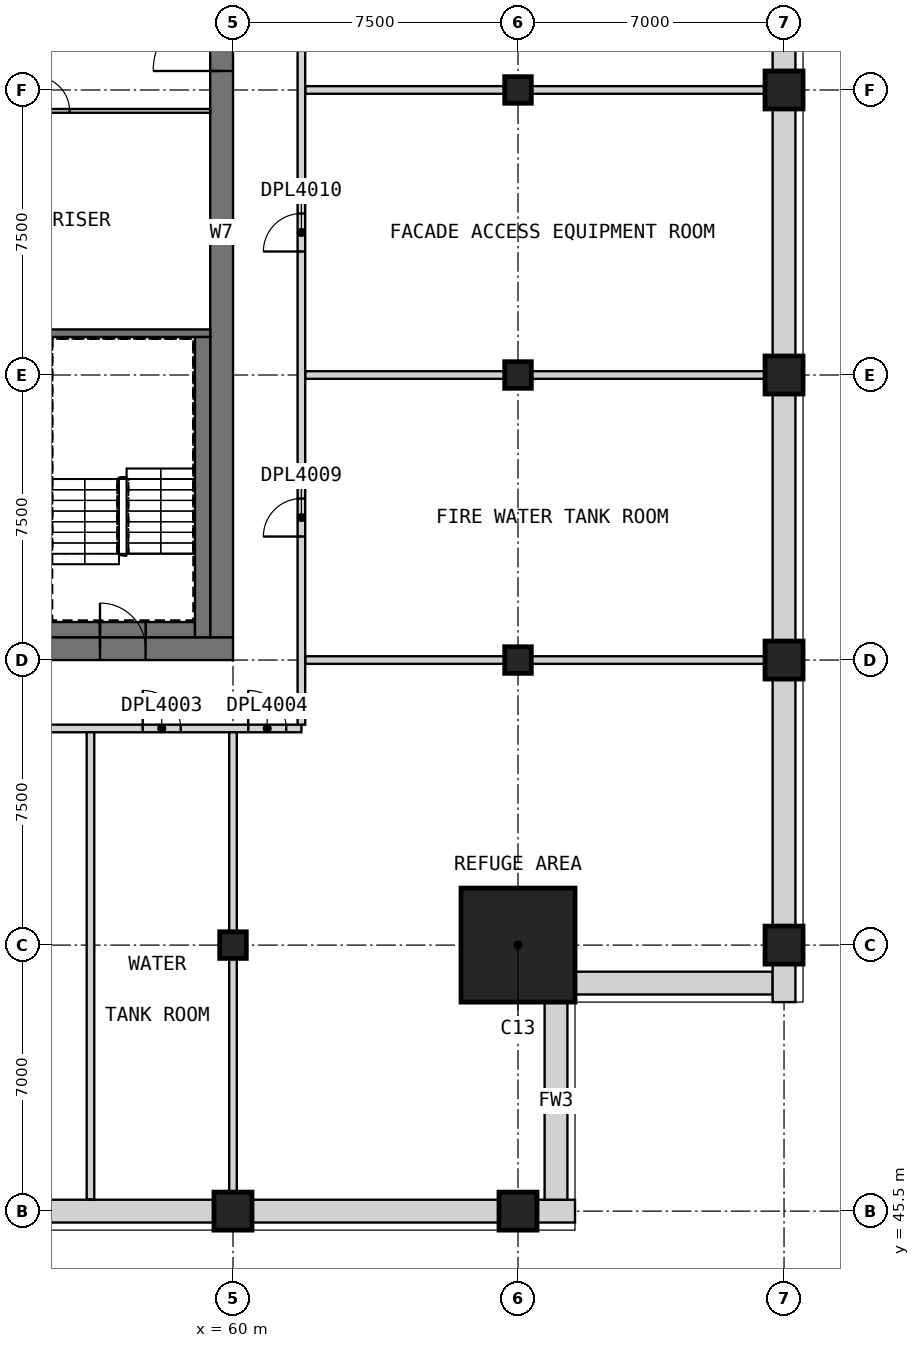
"""IFC4 building model, lengths in metres.
Left out: names, types, materials, properties, quantities, classifications, styles, units other than length and angle.
Written with IfcOpenShell. Run it as: python <this file> out.ifc"""

import sys

from ifc_helpers import new_model, si_unit, direction, frame, frame_2d, origin, origin_2d, place, context, subcontext, project, spatial, rectangle, extrude, element, fill, save


model = new_model("IFC4")
c1 = context("Model", 3, precision=1e-05, world=origin(), true_north=direction((0.0, 1.0)))
c2 = subcontext(c1, "Body", "Model", "MODEL_VIEW")
j1 = project(units=[si_unit("LENGTHUNIT", "METRE"), si_unit("PLANEANGLEUNIT", "RADIAN")], contexts=[c1])
p1 = place(None, origin())
s1 = spatial("IfcSite", under=j1, at=p1, CompositionType="ELEMENT")
p2 = place(p1, origin())
s2 = spatial("IfcBuilding", under=s1, at=p2, CompositionType="ELEMENT")
p3 = place(p2, frame((0.0, 0.0, 314.7)))
s3 = spatial("IfcBuildingStorey", under=s2, at=p3, CompositionType="ELEMENT", Elevation=314.7)
p4 = place(p3, frame((60.0, 45.5, 0.0), z_axis=(0.0, 0.0, 1.0), x_axis=(1.0, 0.0, 0.0)))
e1 = element("IfcColumn", 1, at=p4, inside=s3, PredefinedType="COLUMN", context=c2, shape_type="SweptSolid", body=[
    extrude(rectangle(XDim=1.0, YDim=1.0, at=origin_2d()), origin(), (0.0, 0.0, 1.0), 5.5),
])
p5 = place(p3, frame((60.0, 52.5, 0.0), z_axis=(0.0, 0.0, 1.0), x_axis=(1.0, 0.0, 0.0)))
e2 = element("IfcColumn", 2, at=p5, inside=s3, PredefinedType="COLUMN", context=c2, shape_type="SweptSolid", body=[
    extrude(rectangle(XDim=0.7, YDim=0.7, at=origin_2d()), origin(), (0.0, 0.0, 1.0), 5.5),
])
p6 = place(p3, frame((67.5, 45.5, 0.0), z_axis=(0.0, 0.0, 1.0), x_axis=(1.0, 0.0, 0.0)))
e3 = element("IfcColumn", 3, at=p6, inside=s3, PredefinedType="COLUMN", context=c2, shape_type="SweptSolid", body=[
    extrude(rectangle(XDim=1.0, YDim=1.0, at=origin_2d()), origin(), (0.0, 0.0, 1.0), 5.5),
])
for number, where, z_axis, x_axis in (
    (4, (67.5, 60.0, 0.0), (0.0, 0.0, 1.0), (1.0, 0.0, 0.0)),
    (5, (67.5, 67.5, 0.0), (0.0, 0.0, 1.0), (1.0, 0.0, 0.0)),
    (6, (67.5, 75.0, 0.0), (0.0, 0.0, 1.0), (1.0, 0.0, 0.0)),
):
    element("IfcColumn", number, at=place(p3, frame(where, z_axis=z_axis, x_axis=x_axis)), inside=s3, PredefinedType="COLUMN", context=c2, shape_type="SweptSolid", body=[
        extrude(rectangle(XDim=0.7, YDim=0.7, at=origin_2d()), origin(), (0.0, 0.0, 1.0), 5.5),
    ])
for number, where, z_axis, x_axis in (
    (7, (74.5, 52.5, 0.0), (0.0, 0.0, 1.0), (1.0, 0.0, 0.0)),
    (8, (74.5, 60.0, 0.0), (0.0, 0.0, 1.0), (1.0, 0.0, 0.0)),
    (9, (74.5, 67.5, 0.0), (0.0, 0.0, 1.0), (1.0, 0.0, 0.0)),
    (10, (74.5, 75.0, 0.0), (0.0, 0.0, 1.0), (1.0, 0.0, 0.0)),
):
    element("IfcColumn", number, at=place(p3, frame(where, z_axis=z_axis, x_axis=x_axis)), inside=s3, PredefinedType="COLUMN", context=c2, shape_type="SweptSolid", body=[
        extrude(rectangle(XDim=1.0, YDim=1.0, at=origin_2d()), origin(), (0.0, 0.0, 1.0), 5.5),
    ])
p7 = place(p3, frame((67.5, 52.5, 0.0), z_axis=(0.0, 0.0, 1.0), x_axis=(1.0, 0.0, 0.0)))
e11 = element("IfcColumn", 11, at=p7, inside=s3, PredefinedType="COLUMN", context=c2, shape_type="SweptSolid", body=[
    extrude(rectangle(XDim=3.0, YDim=3.0, at=origin_2d()), origin(), (0.0, 0.0, 1.0), 5.5),
])
p8 = place(p3, frame((30.0, 60.3, 0.0), z_axis=(0.0, 0.0, 1.0), x_axis=(1.0, 0.0, 0.0)))
e12 = element("IfcWall", 12, at=p8, inside=s3, PredefinedType="SHEAR", context=c2, shape_type="SweptSolid", body=[
    extrude(rectangle(XDim=30.0, YDim=0.6, at=frame_2d((15.0, 0.0))), origin(), (0.0, 0.0, 1.0), 5.5),
])
p9 = place(p8, frame((21.9, 0.0, 0.0)))
e13 = element("IfcOpeningElement", 13, at=p9, cuts=e12, PredefinedType="OPENING", context=c2, shape_type="SweptSolid", body=[
    extrude(rectangle(XDim=1.8, YDim=2.1, at=frame_2d((0.9, 1.05))), frame((0.0, 0.31, 0.0), z_axis=(0.0, -1.0, 0.0), x_axis=(1.0, 0.0, 0.0)), (0.0, 0.0, 1.0), 0.62),
])
p10 = place(p8, frame((26.5, 0.0, 0.0)))
e14 = element("IfcOpeningElement", 14, at=p10, cuts=e12, PredefinedType="OPENING", context=c2, shape_type="SweptSolid", body=[
    extrude(rectangle(XDim=1.2, YDim=2.1, at=frame_2d((0.6, 1.05))), frame((0.0, 0.31, 0.0), z_axis=(0.0, -1.0, 0.0), x_axis=(1.0, 0.0, 0.0)), (0.0, 0.0, 1.0), 0.62),
])
p11 = place(p3, frame((59.7, 60.6, 0.0), z_axis=(0.0, 0.0, 1.0), x_axis=(0.0, 1.0, 0.0)))
e15 = element("IfcWall", 15, at=p11, inside=s3, PredefinedType="SHEAR", context=c2, shape_type="SweptSolid", body=[
    extrude(rectangle(XDim=21.3, YDim=0.6, at=frame_2d((10.65, 0.0))), origin(), (0.0, 0.0, 1.0), 5.5),
])
p12 = place(p11, frame((14.9, 0.0, 0.0)))
e16 = element("IfcOpeningElement", 16, at=p12, cuts=e15, PredefinedType="OPENING", context=c2, shape_type="SweptSolid", body=[
    extrude(rectangle(XDim=1.8, YDim=2.1, at=frame_2d((0.9, 1.05))), frame((0.0, 0.31, 0.0), z_axis=(0.0, -1.0, 0.0), x_axis=(1.0, 0.0, 0.0)), (0.0, 0.0, 1.0), 0.62),
])
for number, where, z_axis, x_axis in (
    (17, (53.0, 45.5, 0.0), (0.0, 0.0, 1.0), (1.0, 0.0, 0.0)),
    (18, (60.5, 45.5, 0.0), (0.0, 0.0, 1.0), (1.0, 0.0, 0.0)),
):
    element("IfcWall", number, at=place(p3, frame(where, z_axis=z_axis, x_axis=x_axis)), inside=s3, PredefinedType="ELEMENTEDWALL", context=c2, shape_type="SweptSolid", body=[
        extrude(rectangle(XDim=6.5, YDim=0.6, at=frame_2d((3.25, 0.0))), origin(), (0.0, 0.0, 1.0), 5.1),
    ])
p13 = place(p3, frame((68.0, 45.5, 0.0), z_axis=(0.0, 0.0, 1.0), x_axis=(1.0, 0.0, 0.0)))
e19 = element("IfcWall", 19, at=p13, inside=s3, PredefinedType="ELEMENTEDWALL", context=c2, shape_type="SweptSolid", body=[
    extrude(rectangle(XDim=1.0, YDim=0.6, at=frame_2d((0.5, 0.0))), origin(), (0.0, 0.0, 1.0), 5.1),
])
for number, where, z_axis, x_axis in (
    (20, (68.5, 45.8, 0.0), (0.0, 0.0, 1.0), (0.0, 1.0, 0.0)),
    (21, (69.0, 51.5, 0.0), (0.0, 0.0, 1.0), (1.0, 0.0, 0.0)),
):
    element("IfcWall", number, at=place(p3, frame(where, z_axis=z_axis, x_axis=x_axis)), inside=s3, PredefinedType="ELEMENTEDWALL", context=c2, shape_type="SweptSolid", body=[
        extrude(rectangle(XDim=5.2, YDim=0.6, at=frame_2d((2.6, 0.0))), origin(), (0.0, 0.0, 1.0), 5.1),
    ])
p14 = place(p3, frame((74.5, 51.0, 0.0), z_axis=(0.0, 0.0, 1.0), x_axis=(0.0, 1.0, 0.0)))
e22 = element("IfcWall", 22, at=p14, inside=s3, PredefinedType="ELEMENTEDWALL", context=c2, shape_type="SweptSolid", body=[
    extrude(rectangle(XDim=1.0, YDim=0.6, at=frame_2d((0.5, 0.0))), origin(), (0.0, 0.0, 1.0), 5.1),
])
for number, where, z_axis, x_axis in (
    (23, (74.5, 53.0, 0.0), (0.0, 0.0, 1.0), (0.0, 1.0, 0.0)),
    (24, (74.5, 60.5, 0.0), (0.0, 0.0, 1.0), (0.0, 1.0, 0.0)),
    (25, (74.5, 68.0, 0.0), (0.0, 0.0, 1.0), (0.0, 1.0, 0.0)),
    (26, (74.5, 75.5, 0.0), (0.0, 0.0, 1.0), (0.0, 1.0, 0.0)),
):
    element("IfcWall", number, at=place(p3, frame(where, z_axis=z_axis, x_axis=x_axis)), inside=s3, PredefinedType="ELEMENTEDWALL", context=c2, shape_type="SweptSolid", body=[
        extrude(rectangle(XDim=6.5, YDim=0.6, at=frame_2d((3.25, 0.0))), origin(), (0.0, 0.0, 1.0), 5.1),
    ])
p15 = place(p3, frame((51.1, 68.6, 0.0), z_axis=(0.0, 0.0, 1.0), x_axis=(1.0, 0.0, 0.0)))
e27 = element("IfcWall", 27, at=p15, inside=s3, PredefinedType="SOLIDWALL", context=c2, shape_type="SweptSolid", body=[
    extrude(rectangle(XDim=8.3, YDim=0.2, at=frame_2d((4.15, 0.0))), origin(), (0.0, 0.0, 1.0), 5.09),
])
for number, where, z_axis, x_axis in (
    (28, (55.2, 60.8, 0.0), (0.0, 0.0, 1.0), (1.0, 0.0, 0.0)),
    (29, (57.7, 60.8, 0.0), (0.0, 0.0, 1.0), (1.0, 0.0, 0.0)),
):
    element("IfcWall", number, at=place(p3, frame(where, z_axis=z_axis, x_axis=x_axis)), inside=s3, PredefinedType="SOLIDWALL", context=c2, shape_type="SweptSolid", body=[
        extrude(rectangle(XDim=1.3, YDim=0.4, at=frame_2d((0.65, 0.0))), origin(), (0.0, 0.0, 1.0), 5.09),
    ])
p16 = place(p3, frame((59.2, 60.6, 0.0), z_axis=(0.0, 0.0, 1.0), x_axis=(0.0, 1.0, 0.0)))
e30 = element("IfcWall", 30, at=p16, inside=s3, PredefinedType="SOLIDWALL", context=c2, shape_type="SweptSolid", body=[
    extrude(rectangle(XDim=7.9, YDim=0.4, at=frame_2d((3.95, 0.0))), origin(), (0.0, 0.0, 1.0), 5.09),
])
p17 = place(p3, frame((56.5, 60.8, 3.24), z_axis=(0.0, 0.0, 1.0), x_axis=(1.0, 0.0, 0.0)))
e31 = element("IfcWall", 31, at=p17, inside=s3, PredefinedType="SOLIDWALL", context=c2, shape_type="SweptSolid", body=[
    extrude(rectangle(XDim=1.2, YDim=0.4, at=frame_2d((0.6, 0.0))), origin(), (0.0, 0.0, 1.0), 1.85),
])
p18 = place(p3, frame((51.1, 74.45, 0.0), z_axis=(0.0, 0.0, 1.0), x_axis=(1.0, 0.0, 0.0)))
e32 = element("IfcWall", 32, at=p18, inside=s3, PredefinedType="PARTITIONING", context=c2, shape_type="SweptSolid", body=[
    extrude(rectangle(XDim=8.3, YDim=0.1, at=frame_2d((4.15, 0.0))), origin(), (0.0, 0.0, 1.0), 5.09),
])
p19 = place(p18, frame((3.7, 0.0, 0.0)))
e33 = element("IfcOpeningElement", 33, at=p19, cuts=e32, PredefinedType="OPENING", context=c2, shape_type="SweptSolid", body=[
    extrude(rectangle(XDim=0.9, YDim=2.1, at=frame_2d((0.45, 1.05))), frame((0.0, 0.06, 0.0), z_axis=(0.0, -1.0, 0.0), x_axis=(1.0, 0.0, 0.0)), (0.0, 0.0, 1.0), 0.12),
])
p20 = place(p3, frame((33.85, 58.2, 0.0), z_axis=(0.0, 0.0, 1.0), x_axis=(1.0, 0.0, 0.0)))
e34 = element("IfcWall", 34, at=p20, inside=s3, PredefinedType="PARTITIONING", context=c2, shape_type="SweptSolid", body=[
    extrude(rectangle(XDim=27.95, YDim=0.2, at=frame_2d((13.975, 0.0))), origin(), (0.0, 0.0, 1.0), 5.1),
])
p21 = place(p20, frame((10.65, 0.0, 0.0)))
e35 = element("IfcOpeningElement", 35, at=p21, cuts=e34, PredefinedType="OPENING", context=c2, shape_type="SweptSolid", body=[
    extrude(rectangle(XDim=1.0, YDim=2.1, at=frame_2d((0.5, 1.05))), frame((0.0, 0.11, 0.0), z_axis=(0.0, -1.0, 0.0), x_axis=(1.0, 0.0, 0.0)), (0.0, 0.0, 1.0), 0.22),
])
p22 = place(p20, frame((23.775, 0.0, 0.0)))
e36 = element("IfcOpeningElement", 36, at=p22, cuts=e34, PredefinedType="OPENING", context=c2, shape_type="SweptSolid", body=[
    extrude(rectangle(XDim=1.0, YDim=2.1, at=frame_2d((0.5, 1.05))), frame((0.0, 0.11, 0.0), z_axis=(0.0, -1.0, 0.0), x_axis=(1.0, 0.0, 0.0)), (0.0, 0.0, 1.0), 0.22),
])
p23 = place(p20, frame((26.55, 0.0, 0.0)))
e37 = element("IfcOpeningElement", 37, at=p23, cuts=e34, PredefinedType="OPENING", context=c2, shape_type="SweptSolid", body=[
    extrude(rectangle(XDim=1.0, YDim=2.1, at=frame_2d((0.5, 1.05))), frame((0.0, 0.11, 0.0), z_axis=(0.0, -1.0, 0.0), x_axis=(1.0, 0.0, 0.0)), (0.0, 0.0, 1.0), 0.22),
])
for number, where, z_axis, x_axis in (
    (38, (61.9, 60.0, 0.0), (0.0, 0.0, 1.0), (1.0, 0.0, 0.0)),
    (39, (61.9, 67.5, 0.0), (0.0, 0.0, 1.0), (1.0, 0.0, 0.0)),
    (40, (61.9, 75.0, 0.0), (0.0, 0.0, 1.0), (1.0, 0.0, 0.0)),
):
    element("IfcWall", number, at=place(p3, frame(where, z_axis=z_axis, x_axis=x_axis)), inside=s3, PredefinedType="PARTITIONING", context=c2, shape_type="SweptSolid", body=[
        extrude(rectangle(XDim=13.1, YDim=0.2, at=frame_2d((6.55, 0.0))), origin(), (0.0, 0.0, 1.0), 5.1),
    ])
p24 = place(p3, frame((56.25, 45.81, 0.0), z_axis=(0.0, 0.0, 1.0), x_axis=(0.0, 1.0, 0.0)))
e41 = element("IfcWall", 41, at=p24, inside=s3, PredefinedType="PARTITIONING", context=c2, shape_type="SweptSolid", body=[
    extrude(rectangle(XDim=12.29, YDim=0.2, at=frame_2d((6.145, 0.0))), origin(), (0.0, 0.0, 1.0), 5.1),
])
p25 = place(p3, frame((60.0, 45.0, 0.0), z_axis=(0.0, 0.0, 1.0), x_axis=(0.0, 1.0, 0.0)))
e42 = element("IfcWall", 42, at=p25, inside=s3, PredefinedType="PARTITIONING", context=c2, shape_type="SweptSolid", body=[
    extrude(rectangle(XDim=13.1, YDim=0.2, at=frame_2d((6.55, 0.0))), origin(), (0.0, 0.0, 1.0), 5.1),
])
p26 = place(p3, frame((61.8, 58.3, 0.0), z_axis=(0.0, 0.0, 1.0), x_axis=(0.0, 1.0, 0.0)))
e43 = element("IfcWall", 43, at=p26, inside=s3, PredefinedType="PARTITIONING", context=c2, shape_type="SweptSolid", body=[
    extrude(rectangle(XDim=25.9, YDim=0.2, at=frame_2d((12.95, 0.0))), origin(), (0.0, 0.0, 1.0), 5.1),
])
p27 = place(p26, frame((4.95, 0.0, 0.0)))
e44 = element("IfcOpeningElement", 44, at=p27, cuts=e43, PredefinedType="OPENING", context=c2, shape_type="SweptSolid", body=[
    extrude(rectangle(XDim=1.0, YDim=2.1, at=frame_2d((0.5, 1.05))), frame((0.0, 0.11, 0.0), z_axis=(0.0, -1.0, 0.0), x_axis=(1.0, 0.0, 0.0)), (0.0, 0.0, 1.0), 0.22),
])
p28 = place(p26, frame((12.45, 0.0, 0.0)))
e45 = element("IfcOpeningElement", 45, at=p28, cuts=e43, PredefinedType="OPENING", context=c2, shape_type="SweptSolid", body=[
    extrude(rectangle(XDim=1.0, YDim=2.1, at=frame_2d((0.5, 1.05))), frame((0.0, 0.11, 0.0), z_axis=(0.0, -1.0, 0.0), x_axis=(1.0, 0.0, 0.0)), (0.0, 0.0, 1.0), 0.22),
])
p29 = place(p26, frame((19.95, 0.0, 0.0)))
e46 = element("IfcOpeningElement", 46, at=p29, cuts=e43, PredefinedType="OPENING", context=c2, shape_type="SweptSolid", body=[
    extrude(rectangle(XDim=1.0, YDim=2.1, at=frame_2d((0.5, 1.05))), frame((0.0, 0.11, 0.0), z_axis=(0.0, -1.0, 0.0), x_axis=(1.0, 0.0, 0.0)), (0.0, 0.0, 1.0), 0.22),
])
p30 = place(p12, origin())
e47 = element("IfcDoor", 47, at=p30, inside=s3, OperationType="DOUBLE_DOOR_SINGLE_SWING", PredefinedType="DOOR", context=c2, shape_type="SweptSolid", body=[
    extrude(rectangle(XDim=1.8, YDim=2.1, at=frame_2d((0.9, 1.05))), frame((0.0, 0.025, 0.0), z_axis=(0.0, -1.0, 0.0), x_axis=(1.0, 0.0, 0.0)), (0.0, 0.0, 1.0), 0.05),
])
fill(e16, e47)
p31 = place(p10, origin())
e48 = element("IfcDoor", 48, at=p31, inside=s3, OperationType="SINGLE_SWING_LEFT", PredefinedType="DOOR", context=c2, shape_type="SweptSolid", body=[
    extrude(rectangle(XDim=1.2, YDim=2.1, at=frame_2d((0.6, 1.05))), frame((0.0, 0.025, 0.0), z_axis=(0.0, -1.0, 0.0), x_axis=(1.0, 0.0, 0.0)), (0.0, 0.0, 1.0), 0.05),
])
fill(e14, e48)
p32 = place(p19, origin())
e49 = element("IfcDoor", 49, at=p32, inside=s3, OperationType="SINGLE_SWING_LEFT", PredefinedType="DOOR", context=c2, shape_type="SweptSolid", body=[
    extrude(rectangle(XDim=0.9, YDim=2.1, at=frame_2d((0.45, 1.05))), frame((0.0, 0.025, 0.0), z_axis=(0.0, -1.0, 0.0), x_axis=(1.0, 0.0, 0.0)), (0.0, 0.0, 1.0), 0.05),
])
fill(e33, e49)
p33 = place(p22, origin())
e50 = element("IfcDoor", 50, at=p33, inside=s3, OperationType="SINGLE_SWING_RIGHT", PredefinedType="DOOR", context=c2, shape_type="SweptSolid", body=[
    extrude(rectangle(XDim=1.0, YDim=2.1, at=frame_2d((0.5, 1.05))), frame((0.0, 0.025, 0.0), z_axis=(0.0, -1.0, 0.0), x_axis=(1.0, 0.0, 0.0)), (0.0, 0.0, 1.0), 0.05),
])
fill(e36, e50)
p34 = place(p23, origin())
e51 = element("IfcDoor", 51, at=p34, inside=s3, OperationType="SINGLE_SWING_RIGHT", PredefinedType="DOOR", context=c2, shape_type="SweptSolid", body=[
    extrude(rectangle(XDim=1.0, YDim=2.1, at=frame_2d((0.5, 1.05))), frame((0.0, 0.025, 0.0), z_axis=(0.0, -1.0, 0.0), x_axis=(1.0, 0.0, 0.0)), (0.0, 0.0, 1.0), 0.05),
])
fill(e37, e51)
p35 = place(p27, origin())
e52 = element("IfcDoor", 52, at=p35, inside=s3, OperationType="SINGLE_SWING_RIGHT", PredefinedType="DOOR", context=c2, shape_type="SweptSolid", body=[
    extrude(rectangle(XDim=1.0, YDim=2.1, at=frame_2d((0.5, 1.05))), frame((0.0, 0.025, 0.0), z_axis=(0.0, -1.0, 0.0), x_axis=(1.0, 0.0, 0.0)), (0.0, 0.0, 1.0), 0.05),
])
fill(e44, e52)
p36 = place(p28, origin())
e53 = element("IfcDoor", 53, at=p36, inside=s3, OperationType="SINGLE_SWING_RIGHT", PredefinedType="DOOR", context=c2, shape_type="SweptSolid", body=[
    extrude(rectangle(XDim=1.0, YDim=2.1, at=frame_2d((0.5, 1.05))), frame((0.0, 0.025, 0.0), z_axis=(0.0, -1.0, 0.0), x_axis=(1.0, 0.0, 0.0)), (0.0, 0.0, 1.0), 0.05),
])
fill(e45, e53)
save(model, sys.argv[1])
